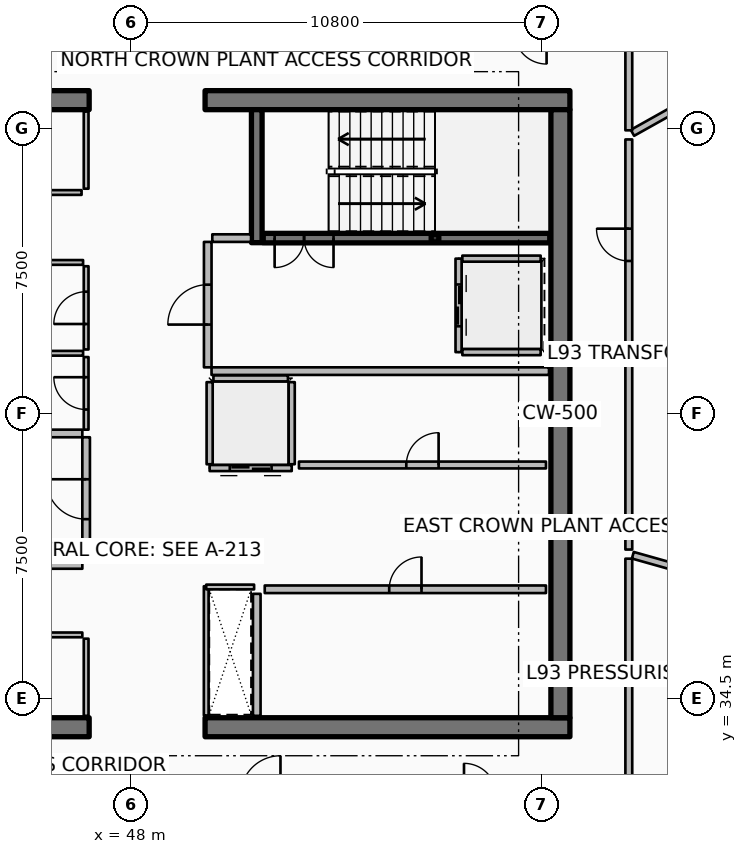
"""IFC4 building model, lengths in metres.
Left out: names, types, materials, properties, quantities, classifications, styles, units other than length and angle.
Written with IfcOpenShell. Run it as: python <this file> out.ifc"""

import sys

from ifc_helpers import new_model, si_unit, direction, frame, frame_2d, origin, origin_2d, place, context, subcontext, project, spatial, rectangle, hollow_rectangle, extrude, element, fill, save


model = new_model("IFC4")
c1 = context("Model", 3, precision=1e-05, world=origin(), true_north=direction((0.0, 1.0)))
c2 = subcontext(c1, "Body", "Model", "MODEL_VIEW")
j1 = project(units=[si_unit("LENGTHUNIT", "METRE"), si_unit("PLANEANGLEUNIT", "RADIAN")], contexts=[c1])
p1 = place(None, origin())
s1 = spatial("IfcSite", under=j1, at=p1, CompositionType="ELEMENT")
p2 = place(p1, origin())
s2 = spatial("IfcBuilding", under=s1, at=p2, CompositionType="ELEMENT")
p3 = place(p2, frame((0.0, 0.0, 370.4)))
s3 = spatial("IfcBuildingStorey", under=s2, at=p3, CompositionType="ELEMENT", Elevation=370.4)
p4 = place(p3, frame((37.3, 33.75, 0.0), z_axis=(0.0, 0.0, 1.0), x_axis=(1.0, 0.0, 0.0)))
e1 = element("IfcWall", 1, at=p4, inside=s3, PredefinedType="SHEAR", context=c2, shape_type="SweptSolid", body=[
    extrude(rectangle(XDim=9.6, YDim=0.5, at=frame_2d((4.8, 0.0))), origin(), (0.0, 0.0, 1.0), 3.6),
])
p5 = place(p3, frame((49.95, 33.75, 0.0), z_axis=(0.0, 0.0, 1.0), x_axis=(1.0, 0.0, 0.0)))
e2 = element("IfcWall", 2, at=p5, inside=s3, PredefinedType="SHEAR", context=c2, shape_type="SweptSolid", body=[
    extrude(rectangle(XDim=9.6, YDim=0.5, at=frame_2d((4.8, 0.0))), origin(), (0.0, 0.0, 1.0), 3.6),
])
p6 = place(p3, frame((37.3, 50.25, 0.0), z_axis=(0.0, 0.0, 1.0), x_axis=(1.0, 0.0, 0.0)))
e3 = element("IfcWall", 3, at=p6, inside=s3, PredefinedType="SHEAR", context=c2, shape_type="SweptSolid", body=[
    extrude(rectangle(XDim=9.6, YDim=0.5, at=frame_2d((4.8, 0.0))), origin(), (0.0, 0.0, 1.0), 3.6),
])
p7 = place(p3, frame((49.95, 50.25, 0.0), z_axis=(0.0, 0.0, 1.0), x_axis=(1.0, 0.0, 0.0)))
e4 = element("IfcWall", 4, at=p7, inside=s3, PredefinedType="SHEAR", context=c2, shape_type="SweptSolid", body=[
    extrude(rectangle(XDim=9.6, YDim=0.5, at=frame_2d((4.8, 0.0))), origin(), (0.0, 0.0, 1.0), 3.6),
])
p8 = place(p3, frame((59.3, 34.0, 0.0), z_axis=(0.0, 0.0, 1.0), x_axis=(0.0, 1.0, 0.0)))
e5 = element("IfcWall", 5, at=p8, inside=s3, PredefinedType="SHEAR", context=c2, shape_type="SweptSolid", body=[
    extrude(rectangle(XDim=16.0, YDim=0.5, at=frame_2d((8.0, 0.0))), origin(), (0.0, 0.0, 1.0), 3.6),
])
p9 = place(p3, frame((51.31, 46.5, 0.0), z_axis=(0.0, 0.0, 1.0), x_axis=(0.0, 1.0, 0.0)))
e6 = element("IfcWall", 6, at=p9, inside=s3, PredefinedType="SHEAR", context=c2, shape_type="SweptSolid", body=[
    extrude(rectangle(XDim=3.5, YDim=0.28, at=frame_2d((1.75, 0.0))), origin(), (0.0, 0.0, 1.0), 3.6),
])
p10 = place(p3, frame((56.0, 46.62, 0.0), z_axis=(0.0, 0.0, 1.0), x_axis=(1.0, 0.0, 0.0)))
e7 = element("IfcColumn", 7, at=p10, inside=s3, PredefinedType="COLUMN", context=c2, shape_type="SweptSolid", body=[
    extrude(hollow_rectangle(XDim=0.2, YDim=0.2, WallThickness=0.01, InnerFilletRadius=0.01, OuterFilletRadius=0.02, at=origin_2d()), origin(), (0.0, 0.0, 1.0), 1.595),
])
p11 = place(p3, frame((51.48, 46.62, 0.0), z_axis=(0.0, 0.0, 1.0), x_axis=(1.0, 0.0, 0.0)))
e8 = element("IfcWall", 8, at=p11, inside=s3, PredefinedType="SOLIDWALL", context=c2, shape_type="SweptSolid", body=[
    extrude(rectangle(XDim=7.54, YDim=0.25, at=frame_2d((3.77, 0.0))), origin(), (0.0, 0.0, 1.0), 3.32),
])
p12 = place(p11, frame((0.3, 0.0, 0.0)))
e9 = element("IfcOpeningElement", 9, at=p12, cuts=e8, PredefinedType="OPENING", context=c2, shape_type="SweptSolid", body=[
    extrude(rectangle(XDim=1.55, YDim=2.15, at=frame_2d((0.775, 1.075))), frame((0.0, 0.135, 0.0), z_axis=(0.0, -1.0, 0.0), x_axis=(1.0, 0.0, 0.0)), (0.0, 0.0, 1.0), 0.27),
])
p13 = place(p3, frame((51.52, 37.38, 0.0), z_axis=(0.0, 0.0, 1.0), x_axis=(1.0, 0.0, 0.0)))
e10 = element("IfcWall", 10, at=p13, inside=s3, PredefinedType="PARTITIONING", context=c2, shape_type="SweptSolid", body=[
    extrude(rectangle(XDim=7.4, YDim=0.2, at=frame_2d((3.7, 0.0))), origin(), (0.0, 0.0, 1.0), 3.32),
])
p14 = place(p13, frame((3.275, 0.0, 0.0)))
e11 = element("IfcOpeningElement", 11, at=p14, cuts=e10, PredefinedType="OPENING", context=c2, shape_type="SweptSolid", body=[
    extrude(rectangle(XDim=0.85, YDim=2.06, at=frame_2d((0.425, 1.03))), frame((0.0, 0.11, 0.0), z_axis=(0.0, -1.0, 0.0), x_axis=(1.0, 0.0, 0.0)), (0.0, 0.0, 1.0), 0.22),
])
p15 = place(p3, frame((51.31, 34.05, 0.0), z_axis=(0.0, 0.0, 1.0), x_axis=(0.0, 1.0, 0.0)))
e12 = element("IfcWall", 12, at=p15, inside=s3, PredefinedType="PARTITIONING", context=c2, shape_type="SweptSolid", body=[
    extrude(rectangle(XDim=3.21, YDim=0.2, at=frame_2d((1.605, 0.0))), origin(), (0.0, 0.0, 1.0), 3.32),
])
p16 = place(p3, frame((56.62, 46.08, 0.0), z_axis=(0.0, 0.0, 1.0), x_axis=(0.0, -1.0, 0.0)))
e13 = element("IfcWall", 13, at=p16, inside=s3, PredefinedType="PARTITIONING", context=c2, shape_type="SweptSolid", body=[
    extrude(rectangle(XDim=2.46, YDim=0.16, at=frame_2d((1.23, 0.0))), origin(), (0.0, 0.0, 1.0), 3.32),
])
p17 = place(p16, frame((0.68, 0.0, 0.0)))
e14 = element("IfcOpeningElement", 14, at=p17, cuts=e13, PredefinedType="OPENING", context=c2, shape_type="SweptSolid", body=[
    extrude(rectangle(XDim=1.1, YDim=2.1, at=frame_2d((0.55, 1.05))), frame((0.0, 0.09, 0.0), z_axis=(0.0, -1.0, 0.0), x_axis=(1.0, 0.0, 0.0)), (0.0, 0.0, 1.0), 0.18),
])
for number, where, z_axis, x_axis in (
    (15, (56.72, 46.08, 0.0), (0.0, 0.0, 1.0), (1.0, 0.0, 0.0)),
    (16, (56.72, 43.62, 0.0), (0.0, 0.0, 1.0), (1.0, 0.0, 0.0)),
):
    element("IfcWall", number, at=place(p3, frame(where, z_axis=z_axis, x_axis=x_axis)), inside=s3, PredefinedType="PARTITIONING", context=c2, shape_type="SweptSolid", body=[
        extrude(rectangle(XDim=2.06, YDim=0.16, at=frame_2d((1.03, 0.0))), origin(), (0.0, 0.0, 1.0), 3.32),
    ])
p18 = place(p3, frame((52.23, 40.57, 0.0), z_axis=(0.0, 0.0, 1.0), x_axis=(-1.0, 0.0, 0.0)))
e17 = element("IfcWall", 17, at=p18, inside=s3, PredefinedType="PARTITIONING", context=c2, shape_type="SweptSolid", body=[
    extrude(rectangle(XDim=2.16, YDim=0.16, at=frame_2d((1.08, 0.0))), origin(), (0.0, 0.0, 1.0), 3.32),
])
p19 = place(p18, frame((0.53, 0.0, 0.0)))
e18 = element("IfcOpeningElement", 18, at=p19, cuts=e17, PredefinedType="OPENING", context=c2, shape_type="SweptSolid", body=[
    extrude(rectangle(XDim=1.1, YDim=2.1, at=frame_2d((0.55, 1.05))), frame((0.0, 0.09, 0.0), z_axis=(0.0, -1.0, 0.0), x_axis=(1.0, 0.0, 0.0)), (0.0, 0.0, 1.0), 0.18),
])
for number, where, z_axis, x_axis in (
    (19, (52.23, 40.67, 0.0), (0.0, 0.0, 1.0), (0.0, 1.0, 0.0)),
    (20, (50.07, 40.67, 0.0), (0.0, 0.0, 1.0), (0.0, 1.0, 0.0)),
):
    element("IfcWall", number, at=place(p3, frame(where, z_axis=z_axis, x_axis=x_axis)), inside=s3, PredefinedType="PARTITIONING", context=c2, shape_type="SweptSolid", body=[
        extrude(rectangle(XDim=2.16, YDim=0.16, at=frame_2d((1.08, 0.0))), origin(), (0.0, 0.0, 1.0), 3.32),
    ])
p20 = place(p3, frame((50.17, 42.93, 0.0), z_axis=(0.0, 0.0, 1.0), x_axis=(1.0, 0.0, 0.0)))
e21 = element("IfcWall", 21, at=p20, inside=s3, PredefinedType="PARTITIONING", context=c2, shape_type="SweptSolid", body=[
    extrude(rectangle(XDim=1.96, YDim=0.16, at=frame_2d((0.98, 0.0))), origin(), (0.0, 0.0, 1.0), 3.32),
])
p21 = place(p3, frame((52.42, 40.65, 0.0), z_axis=(0.0, 0.0, 1.0), x_axis=(1.0, 0.0, 0.0)))
e22 = element("IfcWall", 22, at=p21, inside=s3, PredefinedType="PARTITIONING", context=c2, shape_type="SweptSolid", body=[
    extrude(rectangle(XDim=6.5, YDim=0.18, at=frame_2d((3.25, 0.0))), origin(), (0.0, 0.0, 1.0), 3.32),
])
p22 = place(p21, frame((2.825, 0.0, 0.0)))
e23 = element("IfcOpeningElement", 23, at=p22, cuts=e22, PredefinedType="OPENING", context=c2, shape_type="SweptSolid", body=[
    extrude(rectangle(XDim=0.85, YDim=2.06, at=frame_2d((0.425, 1.03))), frame((0.0, 0.1, 0.0), z_axis=(0.0, -1.0, 0.0), x_axis=(1.0, 0.0, 0.0)), (0.0, 0.0, 1.0), 0.2),
])
p23 = place(p3, frame((46.82, 34.05, 0.0), z_axis=(0.0, 0.0, 1.0), x_axis=(0.0, 1.0, 0.0)))
e24 = element("IfcWall", 24, at=p23, inside=s3, PredefinedType="PARTITIONING", context=c2, shape_type="SweptSolid", body=[
    extrude(rectangle(XDim=2.03, YDim=0.125, at=frame_2d((1.015, 0.0))), origin(), (0.0, 0.0, 1.0), 2.76),
])
p24 = place(p3, frame((42.6, 36.18, 0.0), z_axis=(0.0, 0.0, 1.0), x_axis=(1.0, 0.0, 0.0)))
e25 = element("IfcWall", 25, at=p24, inside=s3, PredefinedType="PARTITIONING", context=c2, shape_type="SweptSolid", body=[
    extrude(rectangle(XDim=4.12, YDim=0.125, at=frame_2d((2.06, 0.0))), origin(), (0.0, 0.0, 1.0), 2.76),
])
p25 = place(p24, frame((1.635, 0.0, 0.0)))
e26 = element("IfcOpeningElement", 26, at=p25, cuts=e25, PredefinedType="OPENING", context=c2, shape_type="SweptSolid", body=[
    extrude(rectangle(XDim=0.85, YDim=2.06, at=frame_2d((0.425, 1.03))), frame((0.0, 0.073, 0.0), z_axis=(0.0, -1.0, 0.0), x_axis=(1.0, 0.0, 0.0)), (0.0, 0.0, 1.0), 0.145),
])
p26 = place(p3, frame((46.82, 47.92, 0.0), z_axis=(0.0, 0.0, 1.0), x_axis=(0.0, 1.0, 0.0)))
e27 = element("IfcWall", 27, at=p26, inside=s3, PredefinedType="PARTITIONING", context=c2, shape_type="SweptSolid", body=[
    extrude(rectangle(XDim=2.03, YDim=0.125, at=frame_2d((1.015, 0.0))), origin(), (0.0, 0.0, 1.0), 2.76),
])
p27 = place(p3, frame((37.92, 47.82, 0.0), z_axis=(0.0, 0.0, 1.0), x_axis=(1.0, 0.0, 0.0)))
e28 = element("IfcWall", 28, at=p27, inside=s3, PredefinedType="PARTITIONING", context=c2, shape_type="SweptSolid", body=[
    extrude(rectangle(XDim=8.78, YDim=0.125, at=frame_2d((4.39, 0.0))), origin(), (0.0, 0.0, 1.0), 2.76),
])
p28 = place(p27, frame((3.965, 0.0, 0.0)))
e29 = element("IfcOpeningElement", 29, at=p28, cuts=e28, PredefinedType="OPENING", context=c2, shape_type="SweptSolid", body=[
    extrude(rectangle(XDim=0.85, YDim=2.06, at=frame_2d((0.425, 1.03))), frame((0.0, 0.073, 0.0), z_axis=(0.0, -1.0, 0.0), x_axis=(1.0, 0.0, 0.0)), (0.0, 0.0, 1.0), 0.145),
])
p29 = place(p3, frame((41.35, 38.02, 0.0), z_axis=(0.0, 0.0, 1.0), x_axis=(1.0, 0.0, 0.0)))
e30 = element("IfcWall", 30, at=p29, inside=s3, PredefinedType="PARTITIONING", context=c2, shape_type="SweptSolid", body=[
    extrude(rectangle(XDim=5.37, YDim=0.2, at=frame_2d((2.685, 0.0))), origin(), (0.0, 0.0, 1.0), 3.32),
])
p30 = place(p3, frame((43.92, 41.48, 0.0), z_axis=(0.0, 0.0, 1.0), x_axis=(1.0, 0.0, 0.0)))
e31 = element("IfcWall", 31, at=p30, inside=s3, PredefinedType="PARTITIONING", context=c2, shape_type="SweptSolid", body=[
    extrude(rectangle(XDim=2.8, YDim=0.2, at=frame_2d((1.4, 0.0))), origin(), (0.0, 0.0, 1.0), 3.32),
])
p31 = place(p3, frame((46.82, 38.12, 0.0), z_axis=(0.0, 0.0, 1.0), x_axis=(0.0, 1.0, 0.0)))
e32 = element("IfcWall", 32, at=p31, inside=s3, PredefinedType="PARTITIONING", context=c2, shape_type="SweptSolid", body=[
    extrude(rectangle(XDim=3.26, YDim=0.2, at=frame_2d((1.63, 0.0))), origin(), (0.0, 0.0, 1.0), 3.32),
])
p32 = place(p31, frame((1.105, 0.0, 0.0)))
e33 = element("IfcOpeningElement", 33, at=p32, cuts=e32, PredefinedType="OPENING", context=c2, shape_type="SweptSolid", body=[
    extrude(rectangle(XDim=1.05, YDim=2.1, at=frame_2d((0.525, 1.05))), frame((0.0, 0.11, 0.0), z_axis=(0.0, -1.0, 0.0), x_axis=(1.0, 0.0, 0.0)), (0.0, 0.0, 1.0), 0.22),
])
p33 = place(p3, frame((50.12, 43.12, 0.0), z_axis=(0.0, 0.0, 1.0), x_axis=(1.0, 0.0, 0.0)))
e34 = element("IfcWall", 34, at=p33, inside=s3, PredefinedType="PARTITIONING", context=c2, shape_type="SweptSolid", body=[
    extrude(rectangle(XDim=8.88, YDim=0.2, at=frame_2d((4.44, 0.0))), origin(), (0.0, 0.0, 1.0), 3.32),
])
p34 = place(p3, frame((50.14, 46.62, 0.0), z_axis=(0.0, 0.0, 1.0), x_axis=(1.0, 0.0, 0.0)))
e35 = element("IfcWall", 35, at=p34, inside=s3, PredefinedType="PARTITIONING", context=c2, shape_type="SweptSolid", body=[
    extrude(rectangle(XDim=1.02, YDim=0.2, at=frame_2d((0.51, 0.0))), origin(), (0.0, 0.0, 1.0), 3.32),
])
p35 = place(p3, frame((50.02, 43.22, 0.0), z_axis=(0.0, 0.0, 1.0), x_axis=(0.0, 1.0, 0.0)))
e36 = element("IfcWall", 36, at=p35, inside=s3, PredefinedType="PARTITIONING", context=c2, shape_type="SweptSolid", body=[
    extrude(rectangle(XDim=3.3, YDim=0.2, at=frame_2d((1.65, 0.0))), origin(), (0.0, 0.0, 1.0), 3.32),
])
p36 = place(p35, frame((1.125, 0.0, 0.0)))
e37 = element("IfcOpeningElement", 37, at=p36, cuts=e36, PredefinedType="OPENING", context=c2, shape_type="SweptSolid", body=[
    extrude(rectangle(XDim=1.05, YDim=2.1, at=frame_2d((0.525, 1.05))), frame((0.0, 0.11, 0.0), z_axis=(0.0, -1.0, 0.0), x_axis=(1.0, 0.0, 0.0)), (0.0, 0.0, 1.0), 0.22),
])
p37 = place(p3, frame((49.98, 34.06, 0.0), z_axis=(0.0, 0.0, 1.0), x_axis=(0.0, 1.0, 0.0)))
e38 = element("IfcWall", 38, at=p37, inside=s3, PredefinedType="PARTITIONING", context=c2, shape_type="SweptSolid", body=[
    extrude(rectangle(XDim=3.4, YDim=0.125, at=frame_2d((1.7, 0.0))), origin(), (0.0, 0.0, 1.0), 2.76),
])
p38 = place(p3, frame((49.98, 37.44, 0.0), z_axis=(0.0, 0.0, 1.0), x_axis=(1.0, 0.0, 0.0)))
e39 = element("IfcWall", 39, at=p38, inside=s3, PredefinedType="PARTITIONING", context=c2, shape_type="SweptSolid", body=[
    extrude(rectangle(XDim=1.26, YDim=0.125, at=frame_2d((0.63, 0.0))), origin(), (0.0, 0.0, 1.0), 2.76),
])
p39 = place(p3, frame((44.03, 43.59, 0.0), z_axis=(0.0, 0.0, 1.0), x_axis=(1.0, 0.0, 0.0)))
e40 = element("IfcWall", 40, at=p39, inside=s3, PredefinedType="PARTITIONING", context=c2, shape_type="SweptSolid", body=[
    extrude(rectangle(XDim=2.71, YDim=0.125, at=frame_2d((1.355, 0.0))), origin(), (0.0, 0.0, 1.0), 2.76),
])
p40 = place(p3, frame((46.82, 41.58, 0.0), z_axis=(0.0, 0.0, 1.0), x_axis=(0.0, 1.0, 0.0)))
e41 = element("IfcWall", 41, at=p40, inside=s3, PredefinedType="PARTITIONING", context=c2, shape_type="SweptSolid", body=[
    extrude(rectangle(XDim=1.91, YDim=0.125, at=frame_2d((0.955, 0.0))), origin(), (0.0, 0.0, 1.0), 2.76),
])
p41 = place(p40, frame((0.53, 0.0, 0.0)))
e42 = element("IfcOpeningElement", 42, at=p41, cuts=e41, PredefinedType="OPENING", context=c2, shape_type="SweptSolid", body=[
    extrude(rectangle(XDim=0.85, YDim=2.06, at=frame_2d((0.425, 1.03))), frame((0.0, 0.073, 0.0), z_axis=(0.0, -1.0, 0.0), x_axis=(1.0, 0.0, 0.0)), (0.0, 0.0, 1.0), 0.145),
])
p42 = place(p3, frame((46.82, 43.69, 0.0), z_axis=(0.0, 0.0, 1.0), x_axis=(0.0, 1.0, 0.0)))
e43 = element("IfcWall", 43, at=p42, inside=s3, PredefinedType="PARTITIONING", context=c2, shape_type="SweptSolid", body=[
    extrude(rectangle(XDim=2.19, YDim=0.125, at=frame_2d((1.095, 0.0))), origin(), (0.0, 0.0, 1.0), 2.76),
])
p43 = place(p42, frame((0.67, 0.0, 0.0)))
e44 = element("IfcOpeningElement", 44, at=p43, cuts=e43, PredefinedType="OPENING", context=c2, shape_type="SweptSolid", body=[
    extrude(rectangle(XDim=0.85, YDim=2.06, at=frame_2d((0.425, 1.03))), frame((0.0, 0.073, 0.0), z_axis=(0.0, -1.0, 0.0), x_axis=(1.0, 0.0, 0.0)), (0.0, 0.0, 1.0), 0.145),
])
p44 = place(p3, frame((45.48, 45.98, 0.0), z_axis=(0.0, 0.0, 1.0), x_axis=(1.0, 0.0, 0.0)))
e45 = element("IfcWall", 45, at=p44, inside=s3, PredefinedType="PARTITIONING", context=c2, shape_type="SweptSolid", body=[
    extrude(rectangle(XDim=1.26, YDim=0.125, at=frame_2d((0.63, 0.0))), origin(), (0.0, 0.0, 1.0), 2.76),
])
p45 = place(p3, frame((61.1, 32.07, 0.0), z_axis=(0.0, 0.0, 1.0), x_axis=(0.0, 1.0, 0.0)))
e46 = element("IfcWall", 46, at=p45, inside=s3, PredefinedType="PARTITIONING", context=c2, shape_type="SweptSolid", body=[
    extrude(rectangle(XDim=6.115, YDim=0.18, at=frame_2d((3.058, 0.0))), origin(), (0.0, 0.0, 1.0), 2.76),
])
p46 = place(p3, frame((61.206, 38.275, 0.0), z_axis=(0.0, 0.0, 1.0), x_axis=(0.962461547865, -0.271418070294, 0.0)))
e47 = element("IfcWall", 47, at=p46, inside=s3, PredefinedType="PARTITIONING", context=c2, shape_type="SweptSolid", body=[
    extrude(rectangle(XDim=6.612, YDim=0.18, at=frame_2d((3.306, 0.0))), origin(), (0.0, 0.0, 1.0), 2.76),
])
p47 = place(p3, frame((61.1, 38.425, 0.0), z_axis=(0.0, 0.0, 1.0), x_axis=(0.0, 1.0, 0.0)))
e48 = element("IfcWall", 48, at=p47, inside=s3, PredefinedType="PARTITIONING", context=c2, shape_type="SweptSolid", body=[
    extrude(rectangle(XDim=5.005, YDim=0.18, at=frame_2d((2.502, 0.0))), origin(), (0.0, 0.0, 1.0), 2.76),
])
p48 = place(p3, frame((61.1, 43.67, 0.0), z_axis=(0.0, 0.0, 1.0), x_axis=(0.0, 1.0, 0.0)))
e49 = element("IfcWall", 49, at=p48, inside=s3, PredefinedType="PARTITIONING", context=c2, shape_type="SweptSolid", body=[
    extrude(rectangle(XDim=5.546, YDim=0.18, at=frame_2d((2.773, 0.0))), origin(), (0.0, 0.0, 1.0), 2.76),
])
p49 = place(p48, frame((2.348, 0.0, 0.0)))
e50 = element("IfcOpeningElement", 50, at=p49, cuts=e49, PredefinedType="OPENING", context=c2, shape_type="SweptSolid", body=[
    extrude(rectangle(XDim=0.85, YDim=2.06, at=frame_2d((0.425, 1.03))), frame((0.0, 0.1, 0.0), z_axis=(0.0, -1.0, 0.0), x_axis=(1.0, 0.0, 0.0)), (0.0, 0.0, 1.0), 0.2),
])
p50 = place(p3, frame((61.196, 49.39, 0.0), z_axis=(0.0, 0.0, 1.0), x_axis=(0.87249769897, 0.488618220385, 0.0)))
e51 = element("IfcWall", 51, at=p50, inside=s3, PredefinedType="PARTITIONING", context=c2, shape_type="SweptSolid", body=[
    extrude(rectangle(XDim=6.007, YDim=0.18, at=frame_2d((3.003, 0.0))), origin(), (0.0, 0.0, 1.0), 2.76),
])
p51 = place(p3, frame((61.1, 49.456, 0.0), z_axis=(0.0, 0.0, 1.0), x_axis=(0.0, 1.0, 0.0)))
e52 = element("IfcWall", 52, at=p51, inside=s3, PredefinedType="PARTITIONING", context=c2, shape_type="SweptSolid", body=[
    extrude(rectangle(XDim=2.474, YDim=0.18, at=frame_2d((1.237, 0.0))), origin(), (0.0, 0.0, 1.0), 2.76),
])
p52 = place(p12, origin())
e53 = element("IfcDoor", 53, at=p52, inside=s3, OperationType="DOUBLE_DOOR_SINGLE_SWING", PredefinedType="DOOR", context=c2, shape_type="SweptSolid", body=[
    extrude(rectangle(XDim=1.55, YDim=2.15, at=frame_2d((0.775, 1.075))), frame((0.0, 0.025, 0.0), z_axis=(0.0, -1.0, 0.0), x_axis=(1.0, 0.0, 0.0)), (0.0, 0.0, 1.0), 0.05),
])
fill(e9, e53)
p53 = place(p14, origin())
e54 = element("IfcDoor", 54, at=p53, inside=s3, OperationType="SINGLE_SWING_RIGHT", PredefinedType="DOOR", context=c2, shape_type="SweptSolid", body=[
    extrude(rectangle(XDim=0.85, YDim=2.06, at=frame_2d((0.425, 1.03))), frame((0.0, 0.025, 0.0), z_axis=(0.0, -1.0, 0.0), x_axis=(1.0, 0.0, 0.0)), (0.0, 0.0, 1.0), 0.05),
])
fill(e11, e54)
p54 = place(p17, origin())
e55 = element("IfcDoor", 55, at=p54, inside=s3, OperationType="DOUBLE_DOOR_SLIDING", PredefinedType="DOOR", context=c2, shape_type="SweptSolid", body=[
    extrude(rectangle(XDim=1.1, YDim=2.1, at=frame_2d((0.55, 1.05))), frame((0.0, 0.025, 0.0), z_axis=(0.0, -1.0, 0.0), x_axis=(1.0, 0.0, 0.0)), (0.0, 0.0, 1.0), 0.05),
])
fill(e14, e55)
p55 = place(p19, origin())
e56 = element("IfcDoor", 56, at=p55, inside=s3, OperationType="DOUBLE_DOOR_SLIDING", PredefinedType="DOOR", context=c2, shape_type="SweptSolid", body=[
    extrude(rectangle(XDim=1.1, YDim=2.1, at=frame_2d((0.55, 1.05))), frame((0.0, 0.025, 0.0), z_axis=(0.0, -1.0, 0.0), x_axis=(1.0, 0.0, 0.0)), (0.0, 0.0, 1.0), 0.05),
])
fill(e18, e56)
p56 = place(p22, origin())
e57 = element("IfcDoor", 57, at=p56, inside=s3, OperationType="SINGLE_SWING_RIGHT", PredefinedType="DOOR", context=c2, shape_type="SweptSolid", body=[
    extrude(rectangle(XDim=0.85, YDim=2.06, at=frame_2d((0.425, 1.03))), frame((0.0, 0.025, 0.0), z_axis=(0.0, -1.0, 0.0), x_axis=(1.0, 0.0, 0.0)), (0.0, 0.0, 1.0), 0.05),
])
fill(e23, e57)
p57 = place(p32, origin())
e58 = element("IfcDoor", 58, at=p57, inside=s3, OperationType="SINGLE_SWING_RIGHT", PredefinedType="DOOR", context=c2, shape_type="SweptSolid", body=[
    extrude(rectangle(XDim=1.05, YDim=2.1, at=frame_2d((0.525, 1.05))), frame((0.0, 0.025, 0.0), z_axis=(0.0, -1.0, 0.0), x_axis=(1.0, 0.0, 0.0)), (0.0, 0.0, 1.0), 0.05),
])
fill(e33, e58)
p58 = place(p36, origin())
e59 = element("IfcDoor", 59, at=p58, inside=s3, OperationType="SINGLE_SWING_LEFT", PredefinedType="DOOR", context=c2, shape_type="SweptSolid", body=[
    extrude(rectangle(XDim=1.05, YDim=2.1, at=frame_2d((0.525, 1.05))), frame((0.0, 0.025, 0.0), z_axis=(0.0, -1.0, 0.0), x_axis=(1.0, 0.0, 0.0)), (0.0, 0.0, 1.0), 0.05),
])
fill(e37, e59)
p59 = place(p41, origin())
e60 = element("IfcDoor", 60, at=p59, inside=s3, OperationType="SINGLE_SWING_RIGHT", PredefinedType="DOOR", context=c2, shape_type="SweptSolid", body=[
    extrude(rectangle(XDim=0.85, YDim=2.06, at=frame_2d((0.425, 1.03))), frame((0.0, 0.025, 0.0), z_axis=(0.0, -1.0, 0.0), x_axis=(1.0, 0.0, 0.0)), (0.0, 0.0, 1.0), 0.05),
])
fill(e42, e60)
p60 = place(p43, origin())
e61 = element("IfcDoor", 61, at=p60, inside=s3, OperationType="SINGLE_SWING_LEFT", PredefinedType="DOOR", context=c2, shape_type="SweptSolid", body=[
    extrude(rectangle(XDim=0.85, YDim=2.06, at=frame_2d((0.425, 1.03))), frame((0.0, 0.025, 0.0), z_axis=(0.0, -1.0, 0.0), x_axis=(1.0, 0.0, 0.0)), (0.0, 0.0, 1.0), 0.05),
])
fill(e44, e61)
p61 = place(p49, origin())
e62 = element("IfcDoor", 62, at=p61, inside=s3, OperationType="SINGLE_SWING_RIGHT", PredefinedType="DOOR", context=c2, shape_type="SweptSolid", body=[
    extrude(rectangle(XDim=0.85, YDim=2.06, at=frame_2d((0.425, 1.03))), frame((0.0, 0.025, 0.0), z_axis=(0.0, -1.0, 0.0), x_axis=(1.0, 0.0, 0.0)), (0.0, 0.0, 1.0), 0.05),
])
fill(e50, e62)
save(model, sys.argv[1])
